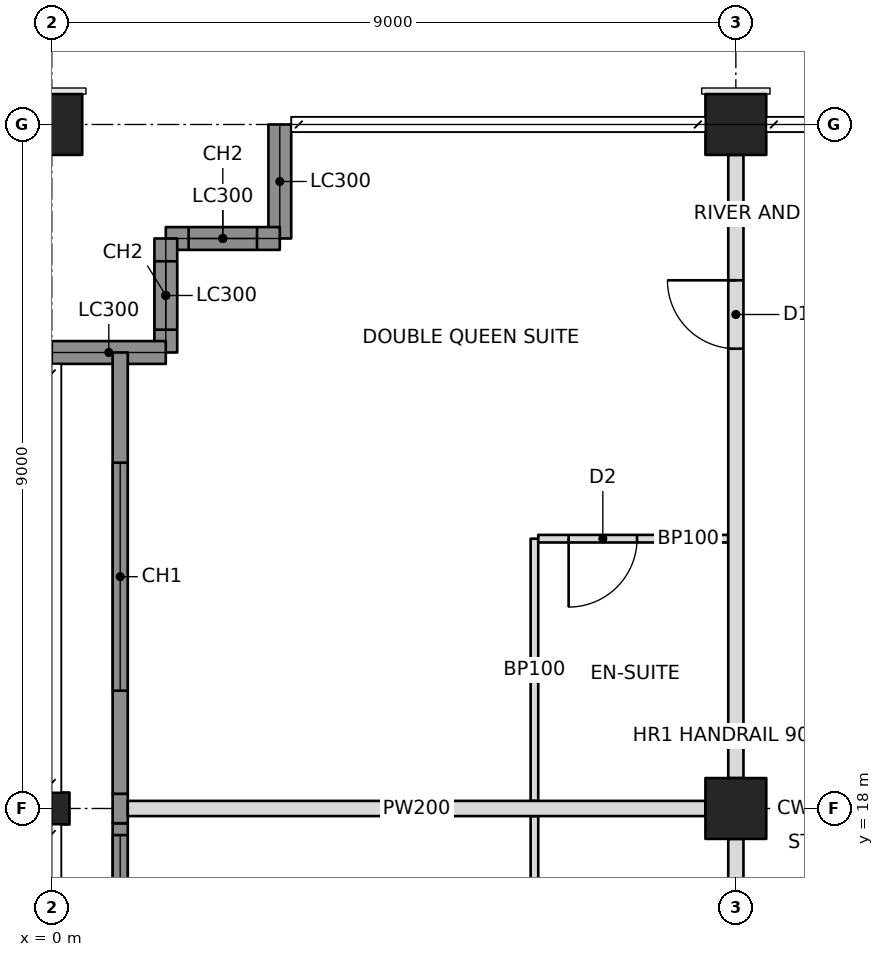
"""IFC4 building model, lengths in metres.
Left out: names, types, materials, properties, quantities, classifications, styles, units other than length and angle.
Written with IfcOpenShell. Run it as: python <this file> out.ifc"""

import sys

from ifc_helpers import new_model, si_unit, direction, frame, frame_2d, origin, origin_2d, place, context, subcontext, project, spatial, rectangle, hollow_rectangle, i_section, extrude, element, fill, save


model = new_model("IFC4")
c1 = context("Model", 3, precision=1e-05, world=origin(), true_north=direction((0.0, 1.0)))
c2 = subcontext(c1, "Body", "Model", "MODEL_VIEW")
j1 = project(units=[si_unit("LENGTHUNIT", "METRE"), si_unit("PLANEANGLEUNIT", "RADIAN")], contexts=[c1])
p1 = place(None, origin())
s1 = spatial("IfcSite", under=j1, at=p1, CompositionType="ELEMENT")
p2 = place(p1, origin())
s2 = spatial("IfcBuilding", under=s1, at=p2, CompositionType="ELEMENT")
p3 = place(p2, frame((0.0, 0.0, 226.6)))
s3 = spatial("IfcBuildingStorey", under=s2, at=p3, CompositionType="ELEMENT", Elevation=226.6)
p4 = place(p3, frame((0.0, 18.0, 0.0), z_axis=(0.0, 0.0, 1.0), x_axis=(0.0, 1.0, 0.0)))
e1 = element("IfcColumn", 1, at=p4, inside=s3, PredefinedType="COLUMN", context=c2, shape_type="SweptSolid", body=[
    extrude(i_section(OverallWidth=0.422, OverallDepth=0.465, WebThickness=0.045, FlangeThickness=0.073, at=origin_2d()), origin(), (0.0, 0.0, 1.0), 3.6),
])
p5 = place(p3, frame((0.0, 27.0, 0.0), z_axis=(0.0, 0.0, 1.0), x_axis=(0.0, 1.0, 0.0)))
e2 = element("IfcColumn", 2, at=p5, inside=s3, PredefinedType="COLUMN", context=c2, shape_type="SweptSolid", body=[
    extrude(hollow_rectangle(XDim=0.8, YDim=0.8, WallThickness=0.05, at=origin_2d()), origin(), (0.0, 0.0, 1.0), 3.6),
])
p6 = place(p3, frame((9.0, 18.0, 0.0), z_axis=(0.0, 0.0, 1.0), x_axis=(1.0, 0.0, 0.0)))
e3 = element("IfcColumn", 3, at=p6, inside=s3, PredefinedType="COLUMN", context=c2, shape_type="SweptSolid", body=[
    extrude(hollow_rectangle(XDim=0.8, YDim=0.8, WallThickness=0.1, at=origin_2d()), origin(), (0.0, 0.0, 1.0), 3.6),
])
p7 = place(p3, frame((9.0, 27.0, 0.0), z_axis=(0.0, 0.0, 1.0), x_axis=(1.0, 0.0, 0.0)))
e4 = element("IfcColumn", 4, at=p7, inside=s3, PredefinedType="COLUMN", context=c2, shape_type="SweptSolid", body=[
    extrude(hollow_rectangle(XDim=0.8, YDim=0.8, WallThickness=0.05, at=origin_2d()), origin(), (0.0, 0.0, 1.0), 3.6),
])
p8 = place(p3, frame((3.0, 27.0, 0.0), z_axis=(0.0, 0.0, 1.0), x_axis=(0.0, -1.0, 0.0)))
e5 = element("IfcWall", 5, at=p8, inside=s3, PredefinedType="SOLIDWALL", context=c2, shape_type="SweptSolid", body=[
    extrude(rectangle(XDim=1.5, YDim=0.3, at=frame_2d((0.75, 0.0))), origin(), (0.0, 0.0, 1.0), 2.62),
])
p9 = place(p3, frame((3.0, 25.5, 0.0), z_axis=(0.0, 0.0, 1.0), x_axis=(-1.0, 0.0, 0.0)))
e6 = element("IfcWall", 6, at=p9, inside=s3, PredefinedType="SOLIDWALL", context=c2, shape_type="SweptSolid", body=[
    extrude(rectangle(XDim=1.5, YDim=0.3, at=frame_2d((0.75, 0.0))), origin(), (0.0, 0.0, 1.0), 3.4),
])
p10 = place(p9, frame((0.3, 0.0, 0.6)))
e7 = element("IfcOpeningElement", 7, at=p10, cuts=e6, PredefinedType="OPENING", context=c2, shape_type="SweptSolid", body=[
    extrude(rectangle(XDim=0.9, YDim=2.2, at=frame_2d((0.45, 1.1))), frame((0.0, 0.16, 0.0), z_axis=(0.0, -1.0, 0.0), x_axis=(1.0, 0.0, 0.0)), (0.0, 0.0, 1.0), 0.32),
])
p11 = place(p3, frame((1.5, 25.5, 0.0), z_axis=(0.0, 0.0, 1.0), x_axis=(0.0, -1.0, 0.0)))
e8 = element("IfcWall", 8, at=p11, inside=s3, PredefinedType="SOLIDWALL", context=c2, shape_type="SweptSolid", body=[
    extrude(rectangle(XDim=1.5, YDim=0.3, at=frame_2d((0.75, 0.0))), origin(), (0.0, 0.0, 1.0), 3.4),
])
p12 = place(p11, frame((0.3, 0.0, 0.6)))
e9 = element("IfcOpeningElement", 9, at=p12, cuts=e8, PredefinedType="OPENING", context=c2, shape_type="SweptSolid", body=[
    extrude(rectangle(XDim=0.9, YDim=2.2, at=frame_2d((0.45, 1.1))), frame((0.0, 0.16, 0.0), z_axis=(0.0, -1.0, 0.0), x_axis=(1.0, 0.0, 0.0)), (0.0, 0.0, 1.0), 0.32),
])
p13 = place(p3, frame((1.5, 24.0, 0.0), z_axis=(0.0, 0.0, 1.0), x_axis=(-1.0, 0.0, 0.0)))
e10 = element("IfcWall", 10, at=p13, inside=s3, PredefinedType="SOLIDWALL", context=c2, shape_type="SweptSolid", body=[
    extrude(rectangle(XDim=1.5, YDim=0.3, at=frame_2d((0.75, 0.0))), origin(), (0.0, 0.0, 1.0), 2.62),
])
p14 = place(p3, frame((9.0, 10.8, 0.0), z_axis=(0.0, 0.0, 1.0), x_axis=(0.0, 1.0, 0.0)))
e11 = element("IfcWall", 11, at=p14, inside=s3, PredefinedType="PARTITIONING", context=c2, shape_type="SweptSolid", body=[
    extrude(rectangle(XDim=6.8, YDim=0.2, at=frame_2d((3.4, 0.0))), origin(), (0.0, 0.0, 1.0), 2.605),
])
p15 = place(p14, frame((0.25, 0.0, 0.0)))
e12 = element("IfcOpeningElement", 12, at=p15, cuts=e11, PredefinedType="OPENING", context=c2, shape_type="SweptSolid", body=[
    extrude(rectangle(XDim=0.9, YDim=2.1, at=frame_2d((0.45, 1.05))), frame((0.0, 0.11, 0.0), z_axis=(0.0, -1.0, 0.0), x_axis=(1.0, 0.0, 0.0)), (0.0, 0.0, 1.0), 0.22),
])
p16 = place(p3, frame((9.0, 18.4, 0.0), z_axis=(0.0, 0.0, 1.0), x_axis=(0.0, 1.0, 0.0)))
e13 = element("IfcWall", 13, at=p16, inside=s3, PredefinedType="PARTITIONING", context=c2, shape_type="SweptSolid", body=[
    extrude(rectangle(XDim=8.2, YDim=0.2, at=frame_2d((4.1, 0.0))), origin(), (0.0, 0.0, 1.0), 2.605),
])
p17 = place(p16, frame((5.65, 0.0, 0.0)))
e14 = element("IfcOpeningElement", 14, at=p17, cuts=e13, PredefinedType="OPENING", context=c2, shape_type="SweptSolid", body=[
    extrude(rectangle(XDim=0.9, YDim=2.1, at=frame_2d((0.45, 1.05))), frame((0.0, 0.11, 0.0), z_axis=(0.0, -1.0, 0.0), x_axis=(1.0, 0.0, 0.0)), (0.0, 0.0, 1.0), 0.22),
])
p18 = place(p3, frame((8.6, 18.0, 0.0), z_axis=(0.0, 0.0, 1.0), x_axis=(-1.0, 0.0, 0.0)))
e15 = element("IfcWall", 15, at=p18, inside=s3, PredefinedType="PARTITIONING", context=c2, shape_type="SweptSolid", body=[
    extrude(rectangle(XDim=7.6, YDim=0.2, at=frame_2d((3.8, 0.0))), origin(), (0.0, 0.0, 1.0), 2.605),
])
for number, where, z_axis, x_axis in (
    (16, (6.35, 14.45, 0.0), (0.0, 0.0, 1.0), (0.0, 1.0, 0.0)),
    (17, (6.35, 18.1, 0.0), (0.0, 0.0, 1.0), (0.0, 1.0, 0.0)),
):
    element("IfcWall", number, at=place(p3, frame(where, z_axis=z_axis, x_axis=x_axis)), inside=s3, PredefinedType="PARTITIONING", context=c2, shape_type="SweptSolid", body=[
        extrude(rectangle(XDim=3.45, YDim=0.1, at=frame_2d((1.725, 0.0))), origin(), (0.0, 0.0, 1.0), 2.604),
    ])
p19 = place(p3, frame((8.9, 21.55, 0.0), z_axis=(0.0, 0.0, 1.0), x_axis=(-1.0, 0.0, 0.0)))
e18 = element("IfcWall", 18, at=p19, inside=s3, PredefinedType="PARTITIONING", context=c2, shape_type="SweptSolid", body=[
    extrude(rectangle(XDim=2.5, YDim=0.1, at=frame_2d((1.25, 0.0))), origin(), (0.0, 0.0, 1.0), 2.604),
])
p20 = place(p19, frame((1.2, 0.0, 0.0)))
e19 = element("IfcOpeningElement", 19, at=p20, cuts=e18, PredefinedType="OPENING", context=c2, shape_type="SweptSolid", body=[
    extrude(rectangle(XDim=0.9, YDim=2.1, at=frame_2d((0.45, 1.05))), frame((0.0, 0.06, 0.0), z_axis=(0.0, -1.0, 0.0), x_axis=(1.0, 0.0, 0.0)), (0.0, 0.0, 1.0), 0.12),
])
p21 = place(p3, frame((0.9, 9.135, 0.0), z_axis=(0.0, 0.0, 1.0), x_axis=(0.0, 1.0, 0.0)))
e20 = element("IfcWall", 20, at=p21, inside=s3, PredefinedType="SOLIDWALL", context=c2, shape_type="SweptSolid", body=[
    extrude(rectangle(XDim=8.671, YDim=0.2, at=frame_2d((4.335, 0.0))), origin(), (0.0, 0.0, 1.0), 3.4),
])
p22 = place(p21, frame((2.015, 0.0, 0.6)))
e21 = element("IfcOpeningElement", 21, at=p22, cuts=e20, PredefinedType="OPENING", context=c2, shape_type="SweptSolid", body=[
    extrude(rectangle(XDim=3.0, YDim=2.2, at=frame_2d((1.5, 1.1))), frame((0.0, 0.11, 0.0), z_axis=(0.0, -1.0, 0.0), x_axis=(1.0, 0.0, 0.0)), (0.0, 0.0, 1.0), 0.22),
])
p23 = place(p21, frame((5.515, 0.0, 0.6)))
e22 = element("IfcOpeningElement", 22, at=p23, cuts=e20, PredefinedType="OPENING", context=c2, shape_type="SweptSolid", body=[
    extrude(rectangle(XDim=3.0, YDim=2.2, at=frame_2d((1.5, 1.1))), frame((0.0, 0.11, 0.0), z_axis=(0.0, -1.0, 0.0), x_axis=(1.0, 0.0, 0.0)), (0.0, 0.0, 1.0), 0.22),
])
p24 = place(p3, frame((0.9, 17.806, 0.0), z_axis=(0.0, 0.0, 1.0), x_axis=(0.0, 1.0, 0.0)))
e23 = element("IfcWall", 23, at=p24, inside=s3, PredefinedType="SOLIDWALL", context=c2, shape_type="SweptSolid", body=[
    extrude(rectangle(XDim=0.388, YDim=0.2, at=frame_2d((0.194, 0.0))), origin(), (0.0, 0.0, 1.0), 2.604),
])
p25 = place(p3, frame((0.9, 18.194, 0.0), z_axis=(0.0, 0.0, 1.0), x_axis=(0.0, 1.0, 0.0)))
e24 = element("IfcWall", 24, at=p25, inside=s3, PredefinedType="SOLIDWALL", context=c2, shape_type="SweptSolid", body=[
    extrude(rectangle(XDim=5.806, YDim=0.2, at=frame_2d((2.903, 0.0))), origin(), (0.0, 0.0, 1.0), 3.4),
])
p26 = place(p25, frame((1.356, 0.0, 0.6)))
e25 = element("IfcOpeningElement", 25, at=p26, cuts=e24, PredefinedType="OPENING", context=c2, shape_type="SweptSolid", body=[
    extrude(rectangle(XDim=3.0, YDim=2.2, at=frame_2d((1.5, 1.1))), frame((0.0, 0.11, 0.0), z_axis=(0.0, -1.0, 0.0), x_axis=(1.0, 0.0, 0.0)), (0.0, 0.0, 1.0), 0.22),
])
p27 = place(p10, origin())
e26 = element("IfcWindow", 26, at=p27, inside=s3, PartitioningType="SINGLE_PANEL", PredefinedType="WINDOW", context=c2, shape_type="SweptSolid", body=[
    extrude(rectangle(XDim=0.9, YDim=2.2, at=frame_2d((0.45, 1.1))), frame((0.0, 0.03, 0.0), z_axis=(0.0, -1.0, 0.0), x_axis=(1.0, 0.0, 0.0)), (0.0, 0.0, 1.0), 0.06),
])
fill(e7, e26)
p28 = place(p12, origin())
e27 = element("IfcWindow", 27, at=p28, inside=s3, PartitioningType="SINGLE_PANEL", PredefinedType="WINDOW", context=c2, shape_type="SweptSolid", body=[
    extrude(rectangle(XDim=0.9, YDim=2.2, at=frame_2d((0.45, 1.1))), frame((0.0, 0.03, 0.0), z_axis=(0.0, -1.0, 0.0), x_axis=(1.0, 0.0, 0.0)), (0.0, 0.0, 1.0), 0.06),
])
fill(e9, e27)
p29 = place(p23, origin())
e28 = element("IfcWindow", 28, at=p29, inside=s3, PartitioningType="TRIPLE_PANEL_VERTICAL", PredefinedType="WINDOW", context=c2, shape_type="SweptSolid", body=[
    extrude(rectangle(XDim=3.0, YDim=2.2, at=frame_2d((1.5, 1.1))), frame((0.0, 0.03, 0.0), z_axis=(0.0, -1.0, 0.0), x_axis=(1.0, 0.0, 0.0)), (0.0, 0.0, 1.0), 0.06),
])
fill(e22, e28)
p30 = place(p26, origin())
e29 = element("IfcWindow", 29, at=p30, inside=s3, PartitioningType="TRIPLE_PANEL_VERTICAL", PredefinedType="WINDOW", context=c2, shape_type="SweptSolid", body=[
    extrude(rectangle(XDim=3.0, YDim=2.2, at=frame_2d((1.5, 1.1))), frame((0.0, 0.03, 0.0), z_axis=(0.0, -1.0, 0.0), x_axis=(1.0, 0.0, 0.0)), (0.0, 0.0, 1.0), 0.06),
])
fill(e25, e29)
p31 = place(p20, origin())
e30 = element("IfcDoor", 30, at=p31, inside=s3, OperationType="SINGLE_SWING_RIGHT", PredefinedType="DOOR", context=c2, shape_type="SweptSolid", body=[
    extrude(rectangle(XDim=0.9, YDim=2.1, at=frame_2d((0.45, 1.05))), frame((0.0, 0.025, 0.0), z_axis=(0.0, -1.0, 0.0), x_axis=(1.0, 0.0, 0.0)), (0.0, 0.0, 1.0), 0.05),
])
fill(e19, e30)
p32 = place(p17, origin())
e31 = element("IfcDoor", 31, at=p32, inside=s3, OperationType="SINGLE_SWING_RIGHT", PredefinedType="DOOR", context=c2, shape_type="SweptSolid", body=[
    extrude(rectangle(XDim=0.9, YDim=2.1, at=frame_2d((0.45, 1.05))), frame((0.0, 0.025, 0.0), z_axis=(0.0, -1.0, 0.0), x_axis=(1.0, 0.0, 0.0)), (0.0, 0.0, 1.0), 0.05),
])
fill(e14, e31)
save(model, sys.argv[1])
